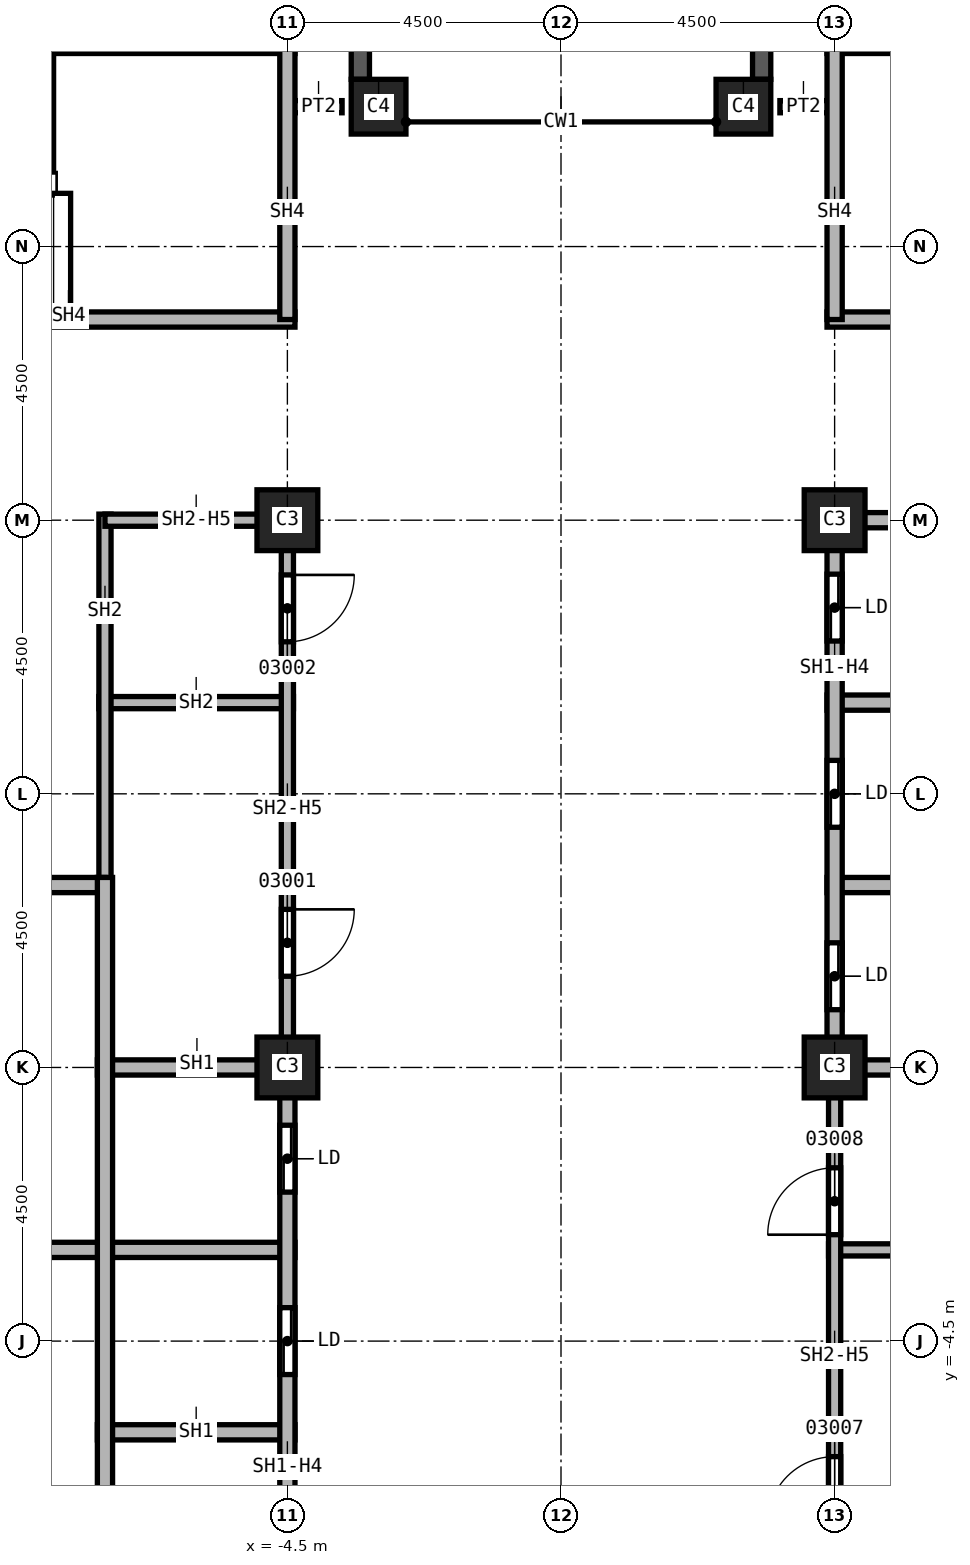
"""IFC4 building model, lengths in metres.
Left out: names, types, materials, properties, quantities, classifications, styles, units other than length and angle.
Written with IfcOpenShell. Run it as: python <this file> out.ifc"""

import sys

from ifc_helpers import new_model, si_unit, direction, frame, frame_2d, origin, origin_2d, place, context, subcontext, project, spatial, rectangle, extrude, element, fill, save


model = new_model("IFC4")
c1 = context("Model", 3, precision=1e-05, world=origin(), true_north=direction((0.0, 1.0)))
c2 = subcontext(c1, "Body", "Model", "MODEL_VIEW")
j1 = project(units=[si_unit("LENGTHUNIT", "METRE"), si_unit("PLANEANGLEUNIT", "RADIAN")], contexts=[c1])
p1 = place(None, origin())
s1 = spatial("IfcSite", under=j1, at=p1, CompositionType="ELEMENT")
p2 = place(p1, origin())
s2 = spatial("IfcBuilding", under=s1, at=p2, CompositionType="ELEMENT")
p3 = place(p2, frame((0.0, 0.0, 92.0)))
s3 = spatial("IfcBuildingStorey", under=s2, at=p3, CompositionType="ELEMENT", Elevation=92.0)
for number, where, z_axis, x_axis in (
    (1, (4.5, 0.0, 0.0), (0.0, 0.0, 1.0), (1.0, 0.0, 0.0)),
    (2, (4.5, 9.0, 0.0), (0.0, 0.0, 1.0), (1.0, 0.0, 0.0)),
    (3, (-4.5, 0.0, 0.0), (0.0, 0.0, 1.0), (1.0, 0.0, 0.0)),
    (4, (-4.5, 9.0, 0.0), (0.0, 0.0, 1.0), (1.0, 0.0, 0.0)),
):
    element("IfcColumn", number, at=place(p3, frame(where, z_axis=z_axis, x_axis=x_axis)), inside=s3, PredefinedType="COLUMN", context=c2, shape_type="SweptSolid", body=[
        extrude(rectangle(XDim=1.0, YDim=1.0, at=origin_2d()), origin(), (0.0, 0.0, 1.0), 3.7),
    ])
for number, where, z_axis, x_axis in (
    (5, (3.0, 15.8, 0.0), (0.0, 0.0, 1.0), (1.0, 0.0, 0.0)),
    (6, (-3.0, 15.8, 0.0), (0.0, 0.0, 1.0), (1.0, 0.0, 0.0)),
):
    element("IfcColumn", number, at=place(p3, frame(where, z_axis=z_axis, x_axis=x_axis)), inside=s3, PredefinedType="COLUMN", context=c2, shape_type="SweptSolid", body=[
        extrude(rectangle(XDim=0.9, YDim=0.9, at=origin_2d()), origin(), (0.0, 0.0, 1.0), 3.7),
    ])
p4 = place(p3, frame((3.3, 24.2, 0.0), z_axis=(0.0, 0.0, 1.0), x_axis=(0.0, -1.0, 0.0)))
e7 = element("IfcWall", 7, at=p4, inside=s3, PredefinedType="SOLIDWALL", context=c2, shape_type="SweptSolid", body=[
    extrude(rectangle(XDim=7.95, YDim=0.3, at=frame_2d((3.975, 0.0))), origin(), (0.0, 0.0, 1.0), 3.1),
])
p5 = place(p4, frame((0.788, 0.0, 0.8)))
e8 = element("IfcOpeningElement", 8, at=p5, cuts=e7, PredefinedType="OPENING", context=c2, shape_type="SweptSolid", body=[
    extrude(rectangle(XDim=2.4, YDim=1.95, at=frame_2d((1.2, 0.975))), frame((0.0, 0.15, 0.0), z_axis=(0.0, -1.0, 0.0), x_axis=(1.0, 0.0, 0.0)), (0.0, 0.0, 1.0), 0.3),
])
p6 = place(p4, frame((4.762, 0.0, 0.8)))
e9 = element("IfcOpeningElement", 9, at=p6, cuts=e7, PredefinedType="OPENING", context=c2, shape_type="SweptSolid", body=[
    extrude(rectangle(XDim=2.4, YDim=1.95, at=frame_2d((1.2, 0.975))), frame((0.0, 0.15, 0.0), z_axis=(0.0, -1.0, 0.0), x_axis=(1.0, 0.0, 0.0)), (0.0, 0.0, 1.0), 0.3),
])
p7 = place(p3, frame((-3.3, 16.25, 0.0), z_axis=(0.0, 0.0, 1.0), x_axis=(0.0, 1.0, 0.0)))
e10 = element("IfcWall", 10, at=p7, inside=s3, PredefinedType="SOLIDWALL", context=c2, shape_type="SweptSolid", body=[
    extrude(rectangle(XDim=7.95, YDim=0.3, at=frame_2d((3.975, 0.0))), origin(), (0.0, 0.0, 1.0), 3.1),
])
p8 = place(p7, frame((0.788, 0.0, 0.8)))
e11 = element("IfcOpeningElement", 11, at=p8, cuts=e10, PredefinedType="OPENING", context=c2, shape_type="SweptSolid", body=[
    extrude(rectangle(XDim=2.4, YDim=1.95, at=frame_2d((1.2, 0.975))), frame((0.0, 0.15, 0.0), z_axis=(0.0, -1.0, 0.0), x_axis=(1.0, 0.0, 0.0)), (0.0, 0.0, 1.0), 0.3),
])
p9 = place(p7, frame((4.762, 0.0, 0.8)))
e12 = element("IfcOpeningElement", 12, at=p9, cuts=e10, PredefinedType="OPENING", context=c2, shape_type="SweptSolid", body=[
    extrude(rectangle(XDim=2.4, YDim=1.95, at=frame_2d((1.2, 0.975))), frame((0.0, 0.15, 0.0), z_axis=(0.0, -1.0, 0.0), x_axis=(1.0, 0.0, 0.0)), (0.0, 0.0, 1.0), 0.3),
])
for number, where, z_axis, x_axis in (
    (13, (-4.5, 15.8, 0.0), (0.0, 0.0, 1.0), (1.0, 0.0, 0.0)),
    (14, (3.6, 15.8, 0.0), (0.0, 0.0, 1.0), (1.0, 0.0, 0.0)),
):
    element("IfcWall", number, at=place(p3, frame(where, z_axis=z_axis, x_axis=x_axis)), inside=s3, PredefinedType="PARTITIONING", context=c2, shape_type="SweptSolid", body=[
        extrude(rectangle(XDim=0.9, YDim=0.2, at=frame_2d((0.45, 0.0))), origin(), (0.0, 0.0, 1.0), 3.7),
    ])
p10 = place(p3, frame((-7.6, 6.0, 0.0), z_axis=(0.0, 0.0, 1.0), x_axis=(1.0, 0.0, 0.0)))
e15 = element("IfcWall", 15, at=p10, inside=s3, PredefinedType="SOLIDWALL", context=c2, shape_type="SweptSolid", body=[
    extrude(rectangle(XDim=3.2, YDim=0.2, at=frame_2d((1.6, 0.0))), origin(), (0.0, 0.0, 1.0), 3.7),
])
p11 = place(p3, frame((-7.5, 2.875, 0.0), z_axis=(0.0, 0.0, 1.0), x_axis=(0.0, 1.0, 0.0)))
e16 = element("IfcWall", 16, at=p11, inside=s3, PredefinedType="SOLIDWALL", context=c2, shape_type="SweptSolid", body=[
    extrude(rectangle(XDim=6.225, YDim=0.2, at=frame_2d((3.113, 0.0))), origin(), (0.0, 0.0, 1.0), 3.7),
])
p12 = place(p3, frame((-7.5, 9.0, 0.0), z_axis=(0.0, 0.0, 1.0), x_axis=(1.0, 0.0, 0.0)))
e17 = element("IfcWall", 17, at=p12, inside=s3, PredefinedType="SOLIDWALL", context=c2, shape_type="SweptSolid", body=[
    extrude(rectangle(XDim=3.0, YDim=0.2, at=frame_2d((1.5, 0.0))), origin(), (0.0, 0.0, 1.0), 2.938),
])
p13 = place(p3, frame((-4.5, 9.1, 0.0), z_axis=(0.0, 0.0, 1.0), x_axis=(0.0, -1.0, 0.0)))
e18 = element("IfcWall", 18, at=p13, inside=s3, PredefinedType="SOLIDWALL", context=c2, shape_type="SweptSolid", body=[
    extrude(rectangle(XDim=9.1, YDim=0.2, at=frame_2d((4.55, 0.0))), origin(), (0.0, 0.0, 1.0), 2.938),
])
p14 = place(p13, frame((6.5, 0.0, 0.0)))
e19 = element("IfcOpeningElement", 19, at=p14, cuts=e18, PredefinedType="OPENING", context=c2, shape_type="SweptSolid", body=[
    extrude(rectangle(XDim=1.1, YDim=2.1, at=frame_2d((0.55, 1.05))), frame((0.0, 0.1, 0.0), z_axis=(0.0, -1.0, 0.0), x_axis=(1.0, 0.0, 0.0)), (0.0, 0.0, 1.0), 0.2),
])
p15 = place(p13, frame((1.0, 0.0, 0.0)))
e20 = element("IfcOpeningElement", 20, at=p15, cuts=e18, PredefinedType="OPENING", context=c2, shape_type="SweptSolid", body=[
    extrude(rectangle(XDim=1.1, YDim=2.1, at=frame_2d((0.55, 1.05))), frame((0.0, 0.1, 0.0), z_axis=(0.0, -1.0, 0.0), x_axis=(1.0, 0.0, 0.0)), (0.0, 0.0, 1.0), 0.2),
])
p16 = place(p3, frame((4.4, -3.0, 0.0), z_axis=(0.0, 0.0, 1.0), x_axis=(1.0, 0.0, 0.0)))
e21 = element("IfcWall", 21, at=p16, inside=s3, PredefinedType="SOLIDWALL", context=c2, shape_type="SweptSolid", body=[
    extrude(rectangle(XDim=3.225, YDim=0.2, at=frame_2d((1.613, 0.0))), origin(), (0.0, 0.0, 1.0), 3.7),
])
p17 = place(p3, frame((4.5, -9.1, 0.0), z_axis=(0.0, 0.0, 1.0), x_axis=(0.0, 1.0, 0.0)))
e22 = element("IfcWall", 22, at=p17, inside=s3, PredefinedType="SOLIDWALL", context=c2, shape_type="SweptSolid", body=[
    extrude(rectangle(XDim=9.1, YDim=0.2, at=frame_2d((4.55, 0.0))), origin(), (0.0, 0.0, 1.0), 2.938),
])
p18 = place(p17, frame((1.6, 0.0, 0.0)))
e23 = element("IfcOpeningElement", 23, at=p18, cuts=e22, PredefinedType="OPENING", context=c2, shape_type="SweptSolid", body=[
    extrude(rectangle(XDim=1.1, YDim=2.1, at=frame_2d((0.55, 1.05))), frame((0.0, 0.1, 0.0), z_axis=(0.0, -1.0, 0.0), x_axis=(1.0, 0.0, 0.0)), (0.0, 0.0, 1.0), 0.2),
])
p19 = place(p17, frame((6.35, 0.0, 0.0)))
e24 = element("IfcOpeningElement", 24, at=p19, cuts=e22, PredefinedType="OPENING", context=c2, shape_type="SweptSolid", body=[
    extrude(rectangle(XDim=1.1, YDim=2.1, at=frame_2d((0.55, 1.05))), frame((0.0, 0.1, 0.0), z_axis=(0.0, -1.0, 0.0), x_axis=(1.0, 0.0, 0.0)), (0.0, 0.0, 1.0), 0.2),
])
p20 = place(p3, frame((-13.625, 3.0, 0.0), z_axis=(0.0, 0.0, 1.0), x_axis=(1.0, 0.0, 0.0)))
e25 = element("IfcWall", 25, at=p20, inside=s3, PredefinedType="SOLIDWALL", context=c2, shape_type="SweptSolid", body=[
    extrude(rectangle(XDim=6.125, YDim=0.25, at=frame_2d((3.062, 0.0))), origin(), (0.0, 0.0, 1.0), 3.7),
])
p21 = place(p20, frame((3.25, 0.0, 0.0)))
e26 = element("IfcOpeningElement", 26, at=p21, cuts=e25, PredefinedType="OPENING", context=c2, shape_type="SweptSolid", body=[
    extrude(rectangle(XDim=1.1, YDim=2.1, at=frame_2d((0.55, 1.05))), frame((0.0, 0.125, 0.0), z_axis=(0.0, -1.0, 0.0), x_axis=(1.0, 0.0, 0.0)), (0.0, 0.0, 1.0), 0.25),
])
p22 = place(p3, frame((-13.625, -3.0, 0.0), z_axis=(0.0, 0.0, 1.0), x_axis=(1.0, 0.0, 0.0)))
e27 = element("IfcWall", 27, at=p22, inside=s3, PredefinedType="SOLIDWALL", context=c2, shape_type="SweptSolid", body=[
    extrude(rectangle(XDim=9.25, YDim=0.25, at=frame_2d((4.625, 0.0))), origin(), (0.0, 0.0, 1.0), 3.7),
])
p23 = place(p22, frame((3.25, 0.0, 0.0)))
e28 = element("IfcOpeningElement", 28, at=p23, cuts=e27, PredefinedType="OPENING", context=c2, shape_type="SweptSolid", body=[
    extrude(rectangle(XDim=1.1, YDim=2.1, at=frame_2d((0.55, 1.05))), frame((0.0, 0.125, 0.0), z_axis=(0.0, -1.0, 0.0), x_axis=(1.0, 0.0, 0.0)), (0.0, 0.0, 1.0), 0.25),
])
for number, where, z_axis, x_axis in (
    (29, (-7.625, -6.0, 0.0), (0.0, 0.0, 1.0), (1.0, 0.0, 0.0)),
    (30, (-7.625, 0.0, 0.0), (0.0, 0.0, 1.0), (1.0, 0.0, 0.0)),
):
    element("IfcWall", number, at=place(p3, frame(where, z_axis=z_axis, x_axis=x_axis)), inside=s3, PredefinedType="SOLIDWALL", context=c2, shape_type="SweptSolid", body=[
        extrude(rectangle(XDim=3.25, YDim=0.25, at=frame_2d((1.625, 0.0))), origin(), (0.0, 0.0, 1.0), 3.7),
    ])
p24 = place(p3, frame((-7.5, -9.125, 0.0), z_axis=(0.0, 0.0, 1.0), x_axis=(0.0, 1.0, 0.0)))
e31 = element("IfcWall", 31, at=p24, inside=s3, PredefinedType="SOLIDWALL", context=c2, shape_type="SweptSolid", body=[
    extrude(rectangle(XDim=12.25, YDim=0.25, at=frame_2d((6.125, 0.0))), origin(), (0.0, 0.0, 1.0), 3.7),
])
p25 = place(p3, frame((-4.5, 0.0, 0.0), z_axis=(0.0, 0.0, 1.0), x_axis=(0.0, -1.0, 0.0)))
e32 = element("IfcWall", 32, at=p25, inside=s3, PredefinedType="SOLIDWALL", context=c2, shape_type="SweptSolid", body=[
    extrude(rectangle(XDim=9.125, YDim=0.25, at=frame_2d((4.562, 0.0))), origin(), (0.0, 0.0, 1.0), 2.938),
])
p26 = place(p25, frame((7.012, 0.0, 0.0)))
e33 = element("IfcOpeningElement", 33, at=p26, cuts=e32, PredefinedType="OPENING", context=c2, shape_type="SweptSolid", body=[
    extrude(rectangle(XDim=1.1, YDim=2.1, at=frame_2d((0.55, 1.05))), frame((0.0, 0.125, 0.0), z_axis=(0.0, -1.0, 0.0), x_axis=(1.0, 0.0, 0.0)), (0.0, 0.0, 1.0), 0.25),
])
p27 = place(p25, frame((3.95, 0.0, 0.0)))
e34 = element("IfcOpeningElement", 34, at=p27, cuts=e32, PredefinedType="OPENING", context=c2, shape_type="SweptSolid", body=[
    extrude(rectangle(XDim=1.1, YDim=2.1, at=frame_2d((0.55, 1.05))), frame((0.0, 0.125, 0.0), z_axis=(0.0, -1.0, 0.0), x_axis=(1.0, 0.0, 0.0)), (0.0, 0.0, 1.0), 0.25),
])
p28 = place(p25, frame((0.95, 0.0, 0.0)))
e35 = element("IfcOpeningElement", 35, at=p28, cuts=e32, PredefinedType="OPENING", context=c2, shape_type="SweptSolid", body=[
    extrude(rectangle(XDim=1.1, YDim=2.1, at=frame_2d((0.55, 1.05))), frame((0.0, 0.125, 0.0), z_axis=(0.0, -1.0, 0.0), x_axis=(1.0, 0.0, 0.0)), (0.0, 0.0, 1.0), 0.25),
])
p29 = place(p3, frame((4.375, 0.0, 0.0), z_axis=(0.0, 0.0, 1.0), x_axis=(1.0, 0.0, 0.0)))
e36 = element("IfcWall", 36, at=p29, inside=s3, PredefinedType="SOLIDWALL", context=c2, shape_type="SweptSolid", body=[
    extrude(rectangle(XDim=3.25, YDim=0.25, at=frame_2d((1.625, 0.0))), origin(), (0.0, 0.0, 1.0), 3.7),
])
p30 = place(p3, frame((4.375, 3.0, 0.0), z_axis=(0.0, 0.0, 1.0), x_axis=(1.0, 0.0, 0.0)))
e37 = element("IfcWall", 37, at=p30, inside=s3, PredefinedType="SOLIDWALL", context=c2, shape_type="SweptSolid", body=[
    extrude(rectangle(XDim=9.25, YDim=0.25, at=frame_2d((4.625, 0.0))), origin(), (0.0, 0.0, 1.0), 3.7),
])
p31 = place(p30, frame((4.125, 0.0, 0.0)))
e38 = element("IfcOpeningElement", 38, at=p31, cuts=e37, PredefinedType="OPENING", context=c2, shape_type="SweptSolid", body=[
    extrude(rectangle(XDim=1.1, YDim=2.1, at=frame_2d((0.55, 1.05))), frame((0.0, 0.125, 0.0), z_axis=(0.0, -1.0, 0.0), x_axis=(1.0, 0.0, 0.0)), (0.0, 0.0, 1.0), 0.25),
])
p32 = place(p3, frame((4.375, 6.0, 0.0), z_axis=(0.0, 0.0, 1.0), x_axis=(1.0, 0.0, 0.0)))
e39 = element("IfcWall", 39, at=p32, inside=s3, PredefinedType="SOLIDWALL", context=c2, shape_type="SweptSolid", body=[
    extrude(rectangle(XDim=3.25, YDim=0.25, at=frame_2d((1.625, 0.0))), origin(), (0.0, 0.0, 1.0), 3.7),
])
p33 = place(p3, frame((4.5, 0.0, 0.0), z_axis=(0.0, 0.0, 1.0), x_axis=(0.0, 1.0, 0.0)))
e40 = element("IfcWall", 40, at=p33, inside=s3, PredefinedType="SOLIDWALL", context=c2, shape_type="SweptSolid", body=[
    extrude(rectangle(XDim=9.125, YDim=0.25, at=frame_2d((4.562, 0.0))), origin(), (0.0, 0.0, 1.0), 2.938),
])
p34 = place(p33, frame((0.95, 0.0, 0.0)))
e41 = element("IfcOpeningElement", 41, at=p34, cuts=e40, PredefinedType="OPENING", context=c2, shape_type="SweptSolid", body=[
    extrude(rectangle(XDim=1.1, YDim=2.1, at=frame_2d((0.55, 1.05))), frame((0.0, 0.125, 0.0), z_axis=(0.0, -1.0, 0.0), x_axis=(1.0, 0.0, 0.0)), (0.0, 0.0, 1.0), 0.25),
])
p35 = place(p33, frame((3.95, 0.0, 0.0)))
e42 = element("IfcOpeningElement", 42, at=p35, cuts=e40, PredefinedType="OPENING", context=c2, shape_type="SweptSolid", body=[
    extrude(rectangle(XDim=1.1, YDim=2.1, at=frame_2d((0.55, 1.05))), frame((0.0, 0.125, 0.0), z_axis=(0.0, -1.0, 0.0), x_axis=(1.0, 0.0, 0.0)), (0.0, 0.0, 1.0), 0.25),
])
p36 = place(p33, frame((7.012, 0.0, 0.0)))
e43 = element("IfcOpeningElement", 43, at=p36, cuts=e40, PredefinedType="OPENING", context=c2, shape_type="SweptSolid", body=[
    extrude(rectangle(XDim=1.1, YDim=2.1, at=frame_2d((0.55, 1.05))), frame((0.0, 0.125, 0.0), z_axis=(0.0, -1.0, 0.0), x_axis=(1.0, 0.0, 0.0)), (0.0, 0.0, 1.0), 0.25),
])
p37 = place(p3, frame((4.5, 9.0, 0.0), z_axis=(0.0, 0.0, 1.0), x_axis=(1.0, 0.0, 0.0)))
e44 = element("IfcWall", 44, at=p37, inside=s3, PredefinedType="SOLIDWALL", context=c2, shape_type="SweptSolid", body=[
    extrude(rectangle(XDim=3.0, YDim=0.25, at=frame_2d((1.5, 0.0))), origin(), (0.0, 0.0, 1.0), 2.938),
])
p38 = place(p3, frame((-13.625, 12.3, 0.0), z_axis=(0.0, 0.0, 1.0), x_axis=(1.0, 0.0, 0.0)))
e45 = element("IfcWall", 45, at=p38, inside=s3, PredefinedType="SOLIDWALL", context=c2, shape_type="SweptSolid", body=[
    extrude(rectangle(XDim=9.25, YDim=0.25, at=frame_2d((4.625, 0.0))), origin(), (0.0, 0.0, 1.0), 3.7),
])
p39 = place(p38, frame((0.85, 0.0, 0.0)))
e46 = element("IfcOpeningElement", 46, at=p39, cuts=e45, PredefinedType="OPENING", context=c2, shape_type="SweptSolid", body=[
    extrude(rectangle(XDim=1.2, YDim=2.1, at=frame_2d((0.6, 1.05))), frame((0.0, 0.125, 0.0), z_axis=(0.0, -1.0, 0.0), x_axis=(1.0, 0.0, 0.0)), (0.0, 0.0, 1.0), 0.25),
])
p40 = place(p3, frame((-13.625, 16.8, 0.0), z_axis=(0.0, 0.0, 1.0), x_axis=(1.0, 0.0, 0.0)))
e47 = element("IfcWall", 47, at=p40, inside=s3, PredefinedType="SOLIDWALL", context=c2, shape_type="SweptSolid", body=[
    extrude(rectangle(XDim=9.25, YDim=0.25, at=frame_2d((4.625, 0.0))), origin(), (0.0, 0.0, 1.0), 3.7),
])
p41 = place(p3, frame((-4.5, 16.8, 0.0), z_axis=(0.0, 0.0, 1.0), x_axis=(0.0, -1.0, 0.0)))
e48 = element("IfcWall", 48, at=p41, inside=s3, PredefinedType="SOLIDWALL", context=c2, shape_type="SweptSolid", body=[
    extrude(rectangle(XDim=4.5, YDim=0.25, at=frame_2d((2.25, 0.0))), origin(), (0.0, 0.0, 1.0), 3.7),
])
p42 = place(p3, frame((4.375, 12.3, 0.0), z_axis=(0.0, 0.0, 1.0), x_axis=(1.0, 0.0, 0.0)))
e49 = element("IfcWall", 49, at=p42, inside=s3, PredefinedType="SOLIDWALL", context=c2, shape_type="SweptSolid", body=[
    extrude(rectangle(XDim=9.25, YDim=0.25, at=frame_2d((4.625, 0.0))), origin(), (0.0, 0.0, 1.0), 3.7),
])
p43 = place(p42, frame((7.2, 0.0, 0.0)))
e50 = element("IfcOpeningElement", 50, at=p43, cuts=e49, PredefinedType="OPENING", context=c2, shape_type="SweptSolid", body=[
    extrude(rectangle(XDim=1.2, YDim=2.1, at=frame_2d((0.6, 1.05))), frame((0.0, 0.125, 0.0), z_axis=(0.0, -1.0, 0.0), x_axis=(1.0, 0.0, 0.0)), (0.0, 0.0, 1.0), 0.25),
])
p44 = place(p3, frame((4.375, 16.8, 0.0), z_axis=(0.0, 0.0, 1.0), x_axis=(1.0, 0.0, 0.0)))
e51 = element("IfcWall", 51, at=p44, inside=s3, PredefinedType="SOLIDWALL", context=c2, shape_type="SweptSolid", body=[
    extrude(rectangle(XDim=9.25, YDim=0.25, at=frame_2d((4.625, 0.0))), origin(), (0.0, 0.0, 1.0), 3.7),
])
p45 = place(p3, frame((4.5, 12.3, 0.0), z_axis=(0.0, 0.0, 1.0), x_axis=(0.0, 1.0, 0.0)))
e52 = element("IfcWall", 52, at=p45, inside=s3, PredefinedType="SOLIDWALL", context=c2, shape_type="SweptSolid", body=[
    extrude(rectangle(XDim=4.5, YDim=0.25, at=frame_2d((2.25, 0.0))), origin(), (0.0, 0.0, 1.0), 3.7),
])
p46 = place(p14, origin())
e53 = element("IfcDoor", 53, at=p46, inside=s3, OperationType="SINGLE_SWING_RIGHT", PredefinedType="DOOR", context=c2, shape_type="SweptSolid", body=[
    extrude(rectangle(XDim=1.1, YDim=2.1, at=frame_2d((0.55, 1.05))), frame((0.0, 0.025, 0.0), z_axis=(0.0, -1.0, 0.0), x_axis=(1.0, 0.0, 0.0)), (0.0, 0.0, 1.0), 0.05),
])
fill(e19, e53)
p47 = place(p15, origin())
e54 = element("IfcDoor", 54, at=p47, inside=s3, OperationType="SINGLE_SWING_LEFT", PredefinedType="DOOR", context=c2, shape_type="SweptSolid", body=[
    extrude(rectangle(XDim=1.1, YDim=2.1, at=frame_2d((0.55, 1.05))), frame((0.0, 0.025, 0.0), z_axis=(0.0, -1.0, 0.0), x_axis=(1.0, 0.0, 0.0)), (0.0, 0.0, 1.0), 0.05),
])
fill(e20, e54)
p48 = place(p18, origin())
e55 = element("IfcDoor", 55, at=p48, inside=s3, OperationType="SINGLE_SWING_RIGHT", PredefinedType="DOOR", context=c2, shape_type="SweptSolid", body=[
    extrude(rectangle(XDim=1.1, YDim=2.1, at=frame_2d((0.55, 1.05))), frame((0.0, 0.025, 0.0), z_axis=(0.0, -1.0, 0.0), x_axis=(1.0, 0.0, 0.0)), (0.0, 0.0, 1.0), 0.05),
])
fill(e23, e55)
p49 = place(p19, origin())
e56 = element("IfcDoor", 56, at=p49, inside=s3, OperationType="SINGLE_SWING_LEFT", PredefinedType="DOOR", context=c2, shape_type="SweptSolid", body=[
    extrude(rectangle(XDim=1.1, YDim=2.1, at=frame_2d((0.55, 1.05))), frame((0.0, 0.025, 0.0), z_axis=(0.0, -1.0, 0.0), x_axis=(1.0, 0.0, 0.0)), (0.0, 0.0, 1.0), 0.05),
])
fill(e24, e56)
p50 = place(p27, origin())
e57 = element("IfcDoor", 57, at=p50, inside=s3, OperationType="SLIDING_TO_LEFT", PredefinedType="DOOR", context=c2, shape_type="SweptSolid", body=[
    extrude(rectangle(XDim=1.1, YDim=2.1, at=frame_2d((0.55, 1.05))), frame((0.0, 0.025, 0.0), z_axis=(0.0, -1.0, 0.0), x_axis=(1.0, 0.0, 0.0)), (0.0, 0.0, 1.0), 0.05),
])
fill(e34, e57)
p51 = place(p28, origin())
e58 = element("IfcDoor", 58, at=p51, inside=s3, OperationType="SLIDING_TO_LEFT", PredefinedType="DOOR", context=c2, shape_type="SweptSolid", body=[
    extrude(rectangle(XDim=1.1, YDim=2.1, at=frame_2d((0.55, 1.05))), frame((0.0, 0.025, 0.0), z_axis=(0.0, -1.0, 0.0), x_axis=(1.0, 0.0, 0.0)), (0.0, 0.0, 1.0), 0.05),
])
fill(e35, e58)
p52 = place(p34, origin())
e59 = element("IfcDoor", 59, at=p52, inside=s3, OperationType="SLIDING_TO_LEFT", PredefinedType="DOOR", context=c2, shape_type="SweptSolid", body=[
    extrude(rectangle(XDim=1.1, YDim=2.1, at=frame_2d((0.55, 1.05))), frame((0.0, 0.025, 0.0), z_axis=(0.0, -1.0, 0.0), x_axis=(1.0, 0.0, 0.0)), (0.0, 0.0, 1.0), 0.05),
])
fill(e41, e59)
p53 = place(p35, origin())
e60 = element("IfcDoor", 60, at=p53, inside=s3, OperationType="SLIDING_TO_LEFT", PredefinedType="DOOR", context=c2, shape_type="SweptSolid", body=[
    extrude(rectangle(XDim=1.1, YDim=2.1, at=frame_2d((0.55, 1.05))), frame((0.0, 0.025, 0.0), z_axis=(0.0, -1.0, 0.0), x_axis=(1.0, 0.0, 0.0)), (0.0, 0.0, 1.0), 0.05),
])
fill(e42, e60)
p54 = place(p36, origin())
e61 = element("IfcDoor", 61, at=p54, inside=s3, OperationType="SLIDING_TO_LEFT", PredefinedType="DOOR", context=c2, shape_type="SweptSolid", body=[
    extrude(rectangle(XDim=1.1, YDim=2.1, at=frame_2d((0.55, 1.05))), frame((0.0, 0.025, 0.0), z_axis=(0.0, -1.0, 0.0), x_axis=(1.0, 0.0, 0.0)), (0.0, 0.0, 1.0), 0.05),
])
fill(e43, e61)
save(model, sys.argv[1])
